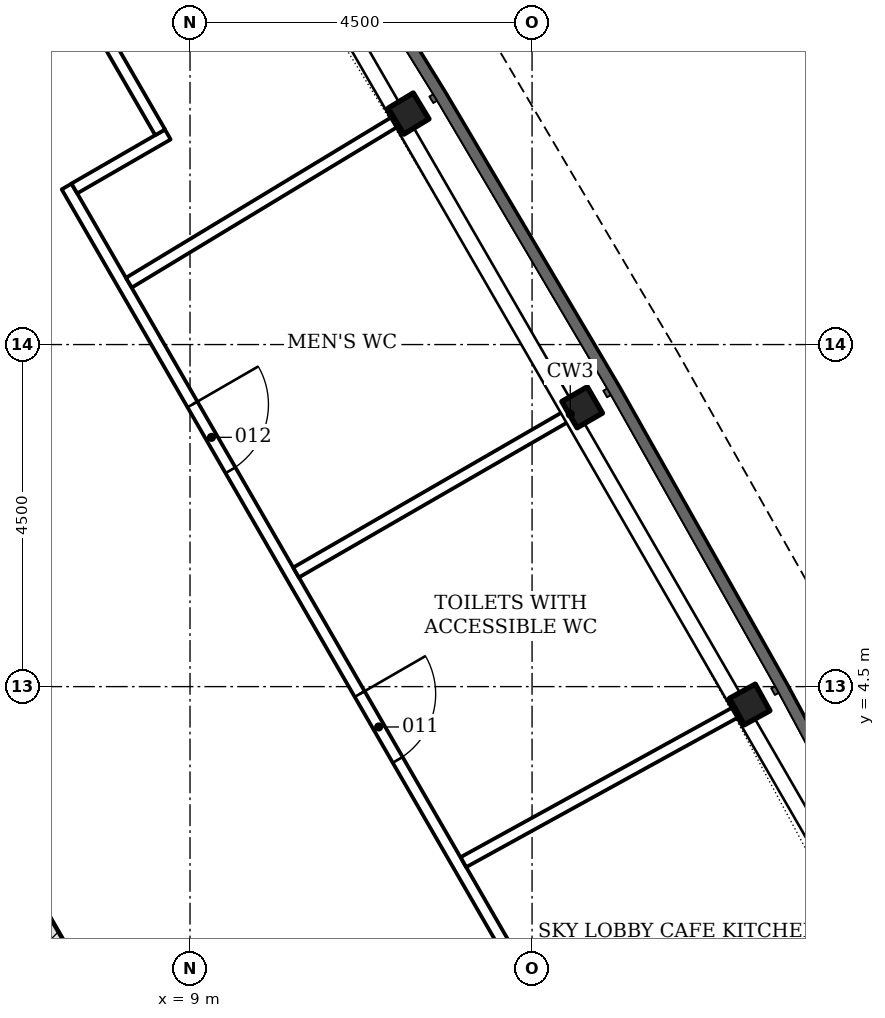
"""IFC4 building model, lengths in metres.
Left out: names, types, materials, properties, quantities, classifications, styles, units other than length and angle.
Written with IfcOpenShell. Run it as: python <this file> out.ifc"""

import sys

from ifc_helpers import new_model, si_unit, direction, frame, frame_2d, origin, origin_2d, place, context, subcontext, project, spatial, rectangle, i_section, extrude, element, fill, save


model = new_model("IFC4")
c1 = context("Model", 3, precision=1e-05, world=origin(), true_north=direction((0.0, 1.0)))
c2 = subcontext(c1, "Body", "Model", "MODEL_VIEW")
j1 = project(units=[si_unit("LENGTHUNIT", "METRE"), si_unit("PLANEANGLEUNIT", "RADIAN")], contexts=[c1])
p1 = place(None, origin())
s1 = spatial("IfcSite", under=j1, at=p1, CompositionType="ELEMENT")
p2 = place(p1, origin())
s2 = spatial("IfcBuilding", under=s1, at=p2, CompositionType="ELEMENT")
p3 = place(p2, frame((0.0, 0.0, 134.7)))
s3 = spatial("IfcBuildingStorey", under=s2, at=p3, CompositionType="ELEMENT", Elevation=134.7)
p4 = place(p3, frame((10.311, -4.703, -0.3), z_axis=(0.0, 0.0, 1.0), x_axis=(-0.500001446645, 0.866024568562, 0.0)))
e1 = element("IfcWall", 1, at=p4, inside=s3, PredefinedType="SHEAR", context=c2, shape_type="SweptSolid", body=[
    extrude(rectangle(XDim=18.458, YDim=0.7, at=frame_2d((9.229, 0.0))), origin(), (0.0, 0.0, 1.0), 5.5),
])
p5 = place(p4, frame((4.379, 0.0, 0.3)))
e2 = element("IfcOpeningElement", 2, at=p5, cuts=e1, PredefinedType="OPENING", context=c2, shape_type="SweptSolid", body=[
    extrude(rectangle(XDim=1.1, YDim=2.1, at=frame_2d((0.55, 1.05))), frame((0.0, 0.36, 0.0), z_axis=(0.0, -1.0, 0.0), x_axis=(1.0, 0.0, 0.0)), (0.0, 0.0, 1.0), 0.72),
])
p6 = place(p4, frame((6.529, 0.0, 0.3)))
e3 = element("IfcOpeningElement", 3, at=p6, cuts=e1, PredefinedType="OPENING", context=c2, shape_type="SweptSolid", body=[
    extrude(rectangle(XDim=1.1, YDim=2.1, at=frame_2d((0.55, 1.05))), frame((0.0, 0.36, 0.0), z_axis=(0.0, -1.0, 0.0), x_axis=(1.0, 0.0, 0.0)), (0.0, 0.0, 1.0), 0.72),
])
p7 = place(p4, frame((8.679, 0.0, 0.3)))
e4 = element("IfcOpeningElement", 4, at=p7, cuts=e1, PredefinedType="OPENING", context=c2, shape_type="SweptSolid", body=[
    extrude(rectangle(XDim=1.1, YDim=2.1, at=frame_2d((0.55, 1.05))), frame((0.0, 0.36, 0.0), z_axis=(0.0, -1.0, 0.0), x_axis=(1.0, 0.0, 0.0)), (0.0, 0.0, 1.0), 0.72),
])
p8 = place(p4, frame((10.829, 0.0, 0.3)))
e5 = element("IfcOpeningElement", 5, at=p8, cuts=e1, PredefinedType="OPENING", context=c2, shape_type="SweptSolid", body=[
    extrude(rectangle(XDim=1.1, YDim=2.1, at=frame_2d((0.55, 1.05))), frame((0.0, 0.36, 0.0), z_axis=(0.0, -1.0, 0.0), x_axis=(1.0, 0.0, 0.0)), (0.0, 0.0, 1.0), 0.72),
])
p9 = place(p4, frame((12.979, 0.0, 0.3)))
e6 = element("IfcOpeningElement", 6, at=p9, cuts=e1, PredefinedType="OPENING", context=c2, shape_type="SweptSolid", body=[
    extrude(rectangle(XDim=1.1, YDim=2.1, at=frame_2d((0.55, 1.05))), frame((0.0, 0.36, 0.0), z_axis=(0.0, -1.0, 0.0), x_axis=(1.0, 0.0, 0.0)), (0.0, 0.0, 1.0), 0.72),
])
for number, where, z_axis, x_axis in (
    (7, (16.364, 4.265, -0.3), (0.0, 0.0, 1.0), (-0.482, 0.876, 0.0)),
    (8, (14.159, 8.175, -0.3), (0.0, 0.0, 1.0), (-0.5, 0.866, 0.0)),
    (9, (11.875, 12.039, -0.3), (0.0, 0.0, 1.0), (-0.517, 0.856, 0.0)),
):
    element("IfcColumn", number, at=place(p3, frame(where, z_axis=z_axis, x_axis=x_axis)), inside=s3, PredefinedType="COLUMN", context=c2, shape_type="SweptSolid", body=[
        extrude(i_section(OverallWidth=0.399, OverallDepth=0.386, WebThickness=0.021, FlangeThickness=0.033, FilletRadius=0.015, at=origin_2d()), origin(), (0.0, 0.0, 1.0), 5.5),
    ])
p10 = place(p3, frame((7.377, 11.079, 0.0), z_axis=(0.0, 0.0, 1.0), x_axis=(0.500006395474, -0.866021711325, 0.0)))
e10 = element("IfcWall", 10, at=p10, inside=s3, PredefinedType="PARTITIONING", context=c2, shape_type="SweptSolid", body=[
    extrude(rectangle(XDim=25.529, YDim=0.15, at=frame_2d((12.765, 0.0))), origin(), (0.0, 0.0, 1.0), 4.647),
])
p11 = place(p10, frame((17.541, 0.0, 0.0)))
e11 = element("IfcOpeningElement", 11, at=p11, cuts=e10, PredefinedType="OPENING", context=c2, shape_type="SweptSolid", body=[
    extrude(rectangle(XDim=1.0, YDim=2.1, at=frame_2d((0.5, 1.05))), frame((0.0, 0.085, 0.0), z_axis=(0.0, -1.0, 0.0), x_axis=(1.0, 0.0, 0.0)), (0.0, 0.0, 1.0), 0.17),
])
p12 = place(p10, frame((7.71, 0.0, 0.0)))
e12 = element("IfcOpeningElement", 12, at=p12, cuts=e10, PredefinedType="OPENING", context=c2, shape_type="SweptSolid", body=[
    extrude(rectangle(XDim=1.0, YDim=2.1, at=frame_2d((0.5, 1.05))), frame((0.0, 0.085, 0.0), z_axis=(0.0, -1.0, 0.0), x_axis=(1.0, 0.0, 0.0)), (0.0, 0.0, 1.0), 0.17),
])
p13 = place(p10, frame((3.311, 0.0, 0.0)))
e13 = element("IfcOpeningElement", 13, at=p13, cuts=e10, PredefinedType="OPENING", context=c2, shape_type="SweptSolid", body=[
    extrude(rectangle(XDim=1.0, YDim=2.1, at=frame_2d((0.5, 1.05))), frame((0.0, 0.085, 0.0), z_axis=(0.0, -1.0, 0.0), x_axis=(1.0, 0.0, 0.0)), (0.0, 0.0, 1.0), 0.17),
])
p14 = place(p3, frame((12.597, 2.191, 0.0), z_axis=(0.0, 0.0, 1.0), x_axis=(0.875990873932, 0.482327677816, 0.0)))
e14 = element("IfcWall", 14, at=p14, inside=s3, PredefinedType="PARTITIONING", context=c2, shape_type="SweptSolid", body=[
    extrude(rectangle(XDim=4.125, YDim=0.15, at=frame_2d((2.062, 0.0))), origin(), (0.0, 0.0, 1.0), 4.647),
])
p15 = place(p3, frame((10.395, 6.002, 0.0), z_axis=(0.0, 0.0, 1.0), x_axis=(0.866022798998, 0.500004511595, 0.0)))
e15 = element("IfcWall", 15, at=p15, inside=s3, PredefinedType="PARTITIONING", context=c2, shape_type="SweptSolid", body=[
    extrude(rectangle(XDim=4.171, YDim=0.15, at=frame_2d((2.085, 0.0))), origin(), (0.0, 0.0, 1.0), 4.647),
])
p16 = place(p3, frame((8.196, 9.814, 0.0), z_axis=(0.0, 0.0, 1.0), x_axis=(0.855675295062, 0.517513081401, 0.0)))
e16 = element("IfcWall", 16, at=p16, inside=s3, PredefinedType="PARTITIONING", context=c2, shape_type="SweptSolid", body=[
    extrude(rectangle(XDim=4.125, YDim=0.15, at=frame_2d((2.062, 0.0))), origin(), (0.0, 0.0, 1.0), 4.647),
])
p17 = place(p3, frame((7.478, 11.054, 0.0), z_axis=(0.0, 0.0, 1.0), x_axis=(0.86606531219, 0.499930870242, 0.0)))
e17 = element("IfcWall", 17, at=p17, inside=s3, PredefinedType="PARTITIONING", context=c2, shape_type="SweptSolid", body=[
    extrude(rectangle(XDim=1.42, YDim=0.15, at=frame_2d((0.71, 0.0))), origin(), (0.0, 0.0, 1.0), 5.2),
])
p18 = place(p3, frame((6.579, 15.305, 0.0), z_axis=(0.0, 0.0, 1.0), x_axis=(0.49997076497, -0.866042281979, 0.0)))
e18 = element("IfcWall", 18, at=p18, inside=s3, PredefinedType="PARTITIONING", context=c2, shape_type="SweptSolid", body=[
    extrude(rectangle(XDim=4.057, YDim=0.15, at=frame_2d((2.028, 0.0))), origin(), (0.0, 0.0, 1.0), 4.723),
])
p19 = place(p18, frame((1.495, 0.0, 0.0)))
e19 = element("IfcOpeningElement", 19, at=p19, cuts=e18, PredefinedType="OPENING", context=c2, shape_type="SweptSolid", body=[
    extrude(rectangle(XDim=1.0, YDim=2.1, at=frame_2d((0.5, 1.05))), frame((0.0, 0.085, 0.0), z_axis=(0.0, -1.0, 0.0), x_axis=(1.0, 0.0, 0.0)), (0.0, 0.0, 1.0), 0.17),
])
p20 = place(p12, origin())
e20 = element("IfcDoor", 20, at=p20, inside=s3, OperationType="SINGLE_SWING_LEFT", PredefinedType="DOOR", context=c2, shape_type="SweptSolid", body=[
    extrude(rectangle(XDim=1.0, YDim=2.1, at=frame_2d((0.5, 1.05))), frame((0.0, 0.025, 0.0), z_axis=(0.0, -1.0, 0.0), x_axis=(1.0, 0.0, 0.0)), (0.0, 0.0, 1.0), 0.05),
])
fill(e12, e20)
p21 = place(p13, origin())
e21 = element("IfcDoor", 21, at=p21, inside=s3, OperationType="SINGLE_SWING_LEFT", PredefinedType="DOOR", context=c2, shape_type="SweptSolid", body=[
    extrude(rectangle(XDim=1.0, YDim=2.1, at=frame_2d((0.5, 1.05))), frame((0.0, 0.025, 0.0), z_axis=(0.0, -1.0, 0.0), x_axis=(1.0, 0.0, 0.0)), (0.0, 0.0, 1.0), 0.05),
])
fill(e13, e21)
save(model, sys.argv[1])
